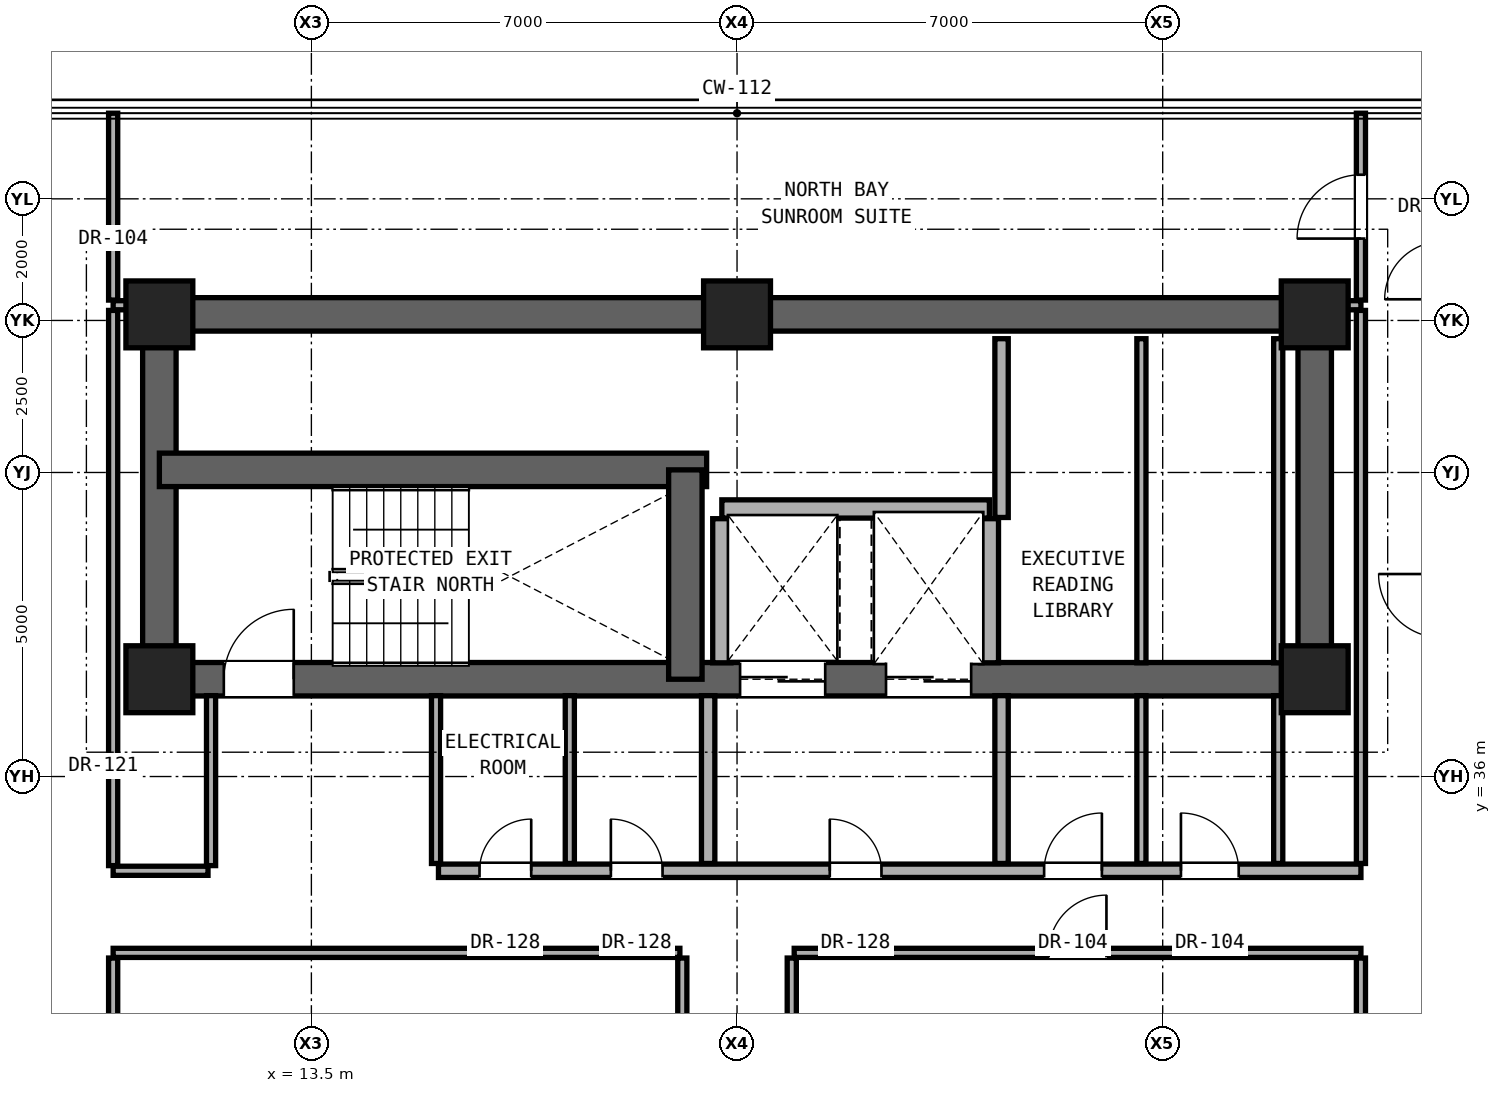
"""IFC4 building model, lengths in metres.
Left out: names, types, materials, properties, quantities, classifications, styles, units other than length and angle.
Written with IfcOpenShell. Run it as: python <this file> out.ifc"""

import sys

from ifc_helpers import new_model, si_unit, direction, frame, frame_2d, origin, origin_2d, place, context, subcontext, project, spatial, rectangle, extrude, element, fill, save


model = new_model("IFC4")
c1 = context("Model", 3, precision=1e-05, world=origin(), true_north=direction((0.0, 1.0)))
c2 = subcontext(c1, "Body", "Model", "MODEL_VIEW")
j1 = project(units=[si_unit("LENGTHUNIT", "METRE"), si_unit("PLANEANGLEUNIT", "RADIAN")], contexts=[c1])
p1 = place(None, origin())
s1 = spatial("IfcSite", under=j1, at=p1, CompositionType="ELEMENT")
p2 = place(p1, origin())
s2 = spatial("IfcBuilding", under=s1, at=p2, CompositionType="ELEMENT")
p3 = place(p2, frame((0.0, 0.0, 137.9)))
s3 = spatial("IfcBuildingStorey", under=s2, at=p3, CompositionType="ELEMENT", Elevation=137.9)
for number, where, z_axis, x_axis in (
    (1, (11.0, 37.6, 0.0), (0.0, 0.0, 1.0), (1.0, 0.0, 0.0)),
    (2, (30.0, 37.6, 0.0), (0.0, 0.0, 1.0), (1.0, 0.0, 0.0)),
    (3, (11.0, 43.6, 0.0), (0.0, 0.0, 1.0), (1.0, 0.0, 0.0)),
    (4, (20.5, 43.6, 0.0), (0.0, 0.0, 1.0), (1.0, 0.0, 0.0)),
    (5, (30.0, 43.6, 0.0), (0.0, 0.0, 1.0), (1.0, 0.0, 0.0)),
):
    element("IfcColumn", number, at=place(p3, frame(where, z_axis=z_axis, x_axis=x_axis)), inside=s3, PredefinedType="COLUMN", context=c2, shape_type="SweptSolid", body=[
        extrude(rectangle(XDim=1.1, YDim=1.1, at=origin_2d()), origin(), (0.0, 0.0, 1.0), 3.3),
    ])
p4 = place(p3, frame((11.0, 43.6, 0.0), z_axis=(0.0, 0.0, 1.0), x_axis=(1.0, 0.0, 0.0)))
e6 = element("IfcWall", 6, at=p4, inside=s3, PredefinedType="SHEAR", context=c2, shape_type="SweptSolid", body=[
    extrude(rectangle(XDim=19.0, YDim=0.55, at=frame_2d((9.5, 0.0))), origin(), (0.0, 0.0, 1.0), 3.08),
])
for number, where, z_axis, x_axis in (
    (7, (11.0, 37.6, 0.0), (0.0, 0.0, 1.0), (0.0, 1.0, 0.0)),
    (8, (30.0, 37.6, 0.0), (0.0, 0.0, 1.0), (0.0, 1.0, 0.0)),
):
    element("IfcWall", number, at=place(p3, frame(where, z_axis=z_axis, x_axis=x_axis)), inside=s3, PredefinedType="SHEAR", context=c2, shape_type="SweptSolid", body=[
        extrude(rectangle(XDim=6.0, YDim=0.55, at=frame_2d((3.0, 0.0))), origin(), (0.0, 0.0, 1.0), 3.08),
    ])
p5 = place(p3, frame((11.0, 37.6, 0.0), z_axis=(0.0, 0.0, 1.0), x_axis=(1.0, 0.0, 0.0)))
e9 = element("IfcWall", 9, at=p5, inside=s3, PredefinedType="SHEAR", context=c2, shape_type="SweptSolid", body=[
    extrude(rectangle(XDim=19.0, YDim=0.55, at=frame_2d((9.5, 0.0))), origin(), (0.0, 0.0, 1.0), 3.08),
])
p6 = place(p5, frame((1.06, 0.0, 0.0)))
e10 = element("IfcOpeningElement", 10, at=p6, cuts=e9, PredefinedType="OPENING", context=c2, shape_type="SweptSolid", body=[
    extrude(rectangle(XDim=1.15, YDim=2.2, at=frame_2d((0.575, 1.1))), frame((0.0, 0.285, 0.0), z_axis=(0.0, -1.0, 0.0), x_axis=(1.0, 0.0, 0.0)), (0.0, 0.0, 1.0), 0.57),
])
p7 = place(p5, frame((9.55, 0.0, 0.0)))
e11 = element("IfcOpeningElement", 11, at=p7, cuts=e9, PredefinedType="OPENING", context=c2, shape_type="SweptSolid", body=[
    extrude(rectangle(XDim=1.4, YDim=2.35, at=frame_2d((0.7, 1.175))), frame((0.0, 0.285, 0.0), z_axis=(0.0, -1.0, 0.0), x_axis=(1.0, 0.0, 0.0)), (0.0, 0.0, 1.0), 0.57),
])
p8 = place(p5, frame((11.95, 0.0, 0.0)))
e12 = element("IfcOpeningElement", 12, at=p8, cuts=e9, PredefinedType="OPENING", context=c2, shape_type="SweptSolid", body=[
    extrude(rectangle(XDim=1.4, YDim=2.35, at=frame_2d((0.7, 1.175))), frame((0.0, 0.285, 0.0), z_axis=(0.0, -1.0, 0.0), x_axis=(1.0, 0.0, 0.0)), (0.0, 0.0, 1.0), 0.57),
])
p9 = place(p3, frame((11.0, 41.043, 0.0), z_axis=(0.0, 0.0, 1.0), x_axis=(1.0, 0.0, 0.0)))
e13 = element("IfcWall", 13, at=p9, inside=s3, PredefinedType="SHEAR", context=c2, shape_type="SweptSolid", body=[
    extrude(rectangle(XDim=9.0, YDim=0.55, at=frame_2d((4.5, 0.0))), origin(), (0.0, 0.0, 1.0), 3.08),
])
p10 = place(p3, frame((19.65, 37.6, 0.0), z_axis=(0.0, 0.0, 1.0), x_axis=(0.0, 1.0, 0.0)))
e14 = element("IfcWall", 14, at=p10, inside=s3, PredefinedType="SHEAR", context=c2, shape_type="SweptSolid", body=[
    extrude(rectangle(XDim=3.443, YDim=0.55, at=frame_2d((1.721, 0.0))), origin(), (0.0, 0.0, 1.0), 3.08),
])
p11 = place(p3, frame((10.24, 33.1, 0.0), z_axis=(0.0, 0.0, 1.0), x_axis=(1.0, 0.0, 0.0)))
e15 = element("IfcWall", 15, at=p11, inside=s3, PredefinedType="PARTITIONING", context=c2, shape_type="SweptSolid", body=[
    extrude(rectangle(XDim=9.32, YDim=0.15, at=frame_2d((4.66, 0.0))), origin(), (0.0, 0.0, 1.0), 2.216),
])
p12 = place(p3, frame((21.44, 33.1, 0.0), z_axis=(0.0, 0.0, 1.0), x_axis=(1.0, 0.0, 0.0)))
e16 = element("IfcWall", 16, at=p12, inside=s3, PredefinedType="PARTITIONING", context=c2, shape_type="SweptSolid", body=[
    extrude(rectangle(XDim=9.32, YDim=0.15, at=frame_2d((4.66, 0.0))), origin(), (0.0, 0.0, 1.0), 2.216),
])
p13 = place(p12, frame((4.185, 0.0, 0.0)))
e17 = element("IfcOpeningElement", 17, at=p13, cuts=e16, PredefinedType="OPENING", context=c2, shape_type="SweptSolid", body=[
    extrude(rectangle(XDim=0.95, YDim=2.15, at=frame_2d((0.475, 1.075))), frame((0.0, 0.085, 0.0), z_axis=(0.0, -1.0, 0.0), x_axis=(1.0, 0.0, 0.0)), (0.0, 0.0, 1.0), 0.17),
])
p14 = place(p3, frame((10.24, 34.45, 0.0), z_axis=(0.0, 0.0, 1.0), x_axis=(1.0, 0.0, 0.0)))
e18 = element("IfcWall", 18, at=p14, inside=s3, PredefinedType="PARTITIONING", context=c2, shape_type="SweptSolid", body=[
    extrude(rectangle(XDim=1.56, YDim=0.15, at=frame_2d((0.78, 0.0))), origin(), (0.0, 0.0, 1.0), 2.216),
])
p15 = place(p3, frame((15.59, 34.45, 0.0), z_axis=(0.0, 0.0, 1.0), x_axis=(1.0, 0.0, 0.0)))
e19 = element("IfcWall", 19, at=p15, inside=s3, PredefinedType="SOLIDWALL", context=c2, shape_type="SweptSolid", body=[
    extrude(rectangle(XDim=15.17, YDim=0.22, at=frame_2d((7.585, 0.0))), origin(), (0.0, 0.0, 1.0), 2.216),
])
p16 = place(p15, frame((6.435, 0.0, 0.0)))
e20 = element("IfcOpeningElement", 20, at=p16, cuts=e19, PredefinedType="OPENING", context=c2, shape_type="SweptSolid", body=[
    extrude(rectangle(XDim=0.85, YDim=2.01, at=frame_2d((0.425, 1.005))), frame((0.0, 0.12, 0.0), z_axis=(0.0, -1.0, 0.0), x_axis=(1.0, 0.0, 0.0)), (0.0, 0.0, 1.0), 0.24),
])
p17 = place(p15, frame((9.96, 0.0, 0.0)))
e21 = element("IfcOpeningElement", 21, at=p17, cuts=e19, PredefinedType="OPENING", context=c2, shape_type="SweptSolid", body=[
    extrude(rectangle(XDim=0.95, YDim=2.15, at=frame_2d((0.475, 1.075))), frame((0.0, 0.12, 0.0), z_axis=(0.0, -1.0, 0.0), x_axis=(1.0, 0.0, 0.0)), (0.0, 0.0, 1.0), 0.24),
])
p18 = place(p15, frame((12.21, 0.0, 0.0)))
e22 = element("IfcOpeningElement", 22, at=p18, cuts=e19, PredefinedType="OPENING", context=c2, shape_type="SweptSolid", body=[
    extrude(rectangle(XDim=0.95, YDim=2.15, at=frame_2d((0.475, 1.075))), frame((0.0, 0.12, 0.0), z_axis=(0.0, -1.0, 0.0), x_axis=(1.0, 0.0, 0.0)), (0.0, 0.0, 1.0), 0.24),
])
p19 = place(p15, frame((0.675, 0.0, 0.0)))
e23 = element("IfcOpeningElement", 23, at=p19, cuts=e19, PredefinedType="OPENING", context=c2, shape_type="SweptSolid", body=[
    extrude(rectangle(XDim=0.85, YDim=2.01, at=frame_2d((0.425, 1.005))), frame((0.0, 0.12, 0.0), z_axis=(0.0, -1.0, 0.0), x_axis=(1.0, 0.0, 0.0)), (0.0, 0.0, 1.0), 0.24),
])
p20 = place(p15, frame((2.835, 0.0, 0.0)))
e24 = element("IfcOpeningElement", 24, at=p20, cuts=e19, PredefinedType="OPENING", context=c2, shape_type="SweptSolid", body=[
    extrude(rectangle(XDim=0.85, YDim=2.01, at=frame_2d((0.425, 1.005))), frame((0.0, 0.12, 0.0), z_axis=(0.0, -1.0, 0.0), x_axis=(1.0, 0.0, 0.0)), (0.0, 0.0, 1.0), 0.24),
])
p21 = place(p3, frame((20.25, 40.4, 0.0), z_axis=(0.0, 0.0, 1.0), x_axis=(1.0, 0.0, 0.0)))
e25 = element("IfcWall", 25, at=p21, inside=s3, PredefinedType="SOLIDWALL", context=c2, shape_type="SweptSolid", body=[
    extrude(rectangle(XDim=4.4, YDim=0.3, at=frame_2d((2.2, 0.0))), origin(), (0.0, 0.0, 1.0), 3.08),
])
for number, where, z_axis, x_axis in (
    (26, (10.24, 43.75, 0.0), (0.0, 0.0, 1.0), (1.0, 0.0, 0.0)),
    (27, (30.27, 43.75, 0.0), (0.0, 0.0, 1.0), (1.0, 0.0, 0.0)),
):
    element("IfcWall", number, at=place(p3, frame(where, z_axis=z_axis, x_axis=x_axis)), inside=s3, PredefinedType="PARTITIONING", context=c2, shape_type="SweptSolid", body=[
        extrude(rectangle(XDim=0.49, YDim=0.15, at=frame_2d((0.245, 0.0))), origin(), (0.0, 0.0, 1.0), 3.08),
    ])
p22 = place(p3, frame((10.24, 27.485, 0.0), z_axis=(0.0, 0.0, 1.0), x_axis=(0.0, 1.0, 0.0)))
e28 = element("IfcWall", 28, at=p22, inside=s3, PredefinedType="PARTITIONING", context=c2, shape_type="SweptSolid", body=[
    extrude(rectangle(XDim=5.53, YDim=0.15, at=frame_2d((2.765, 0.0))), origin(), (0.0, 0.0, 1.0), 2.299),
])
p23 = place(p22, frame((2.29, 0.0, 0.0)))
e29 = element("IfcOpeningElement", 29, at=p23, cuts=e28, PredefinedType="OPENING", context=c2, shape_type="SweptSolid", body=[
    extrude(rectangle(XDim=0.95, YDim=2.15, at=frame_2d((0.475, 1.075))), frame((0.0, 0.085, 0.0), z_axis=(0.0, -1.0, 0.0), x_axis=(1.0, 0.0, 0.0)), (0.0, 0.0, 1.0), 0.17),
])
p24 = place(p3, frame((10.24, 34.535, 0.0), z_axis=(0.0, 0.0, 1.0), x_axis=(0.0, 1.0, 0.0)))
e30 = element("IfcWall", 30, at=p24, inside=s3, PredefinedType="PARTITIONING", context=c2, shape_type="SweptSolid", body=[
    extrude(rectangle(XDim=9.13, YDim=0.15, at=frame_2d((4.565, 0.0))), origin(), (0.0, 0.0, 1.0), 2.456),
])
p25 = place(p3, frame((10.24, 43.835, 0.0), z_axis=(0.0, 0.0, 1.0), x_axis=(0.0, 1.0, 0.0)))
e31 = element("IfcWall", 31, at=p25, inside=s3, PredefinedType="PARTITIONING", context=c2, shape_type="SweptSolid", body=[
    extrude(rectangle(XDim=3.073, YDim=0.15, at=frame_2d((1.537, 0.0))), origin(), (0.0, 0.0, 1.0), 3.08),
])
p26 = place(p3, frame((11.85, 34.535, 0.0), z_axis=(0.0, 0.0, 1.0), x_axis=(0.0, 1.0, 0.0)))
e32 = element("IfcWall", 32, at=p26, inside=s3, PredefinedType="PARTITIONING", context=c2, shape_type="SweptSolid", body=[
    extrude(rectangle(XDim=2.795, YDim=0.15, at=frame_2d((1.397, 0.0))), origin(), (0.0, 0.0, 1.0), 3.08),
])
p27 = place(p3, frame((15.55, 34.57, 0.0), z_axis=(0.0, 0.0, 1.0), x_axis=(0.0, 1.0, 0.0)))
e33 = element("IfcWall", 33, at=p27, inside=s3, PredefinedType="PARTITIONING", context=c2, shape_type="SweptSolid", body=[
    extrude(rectangle(XDim=2.76, YDim=0.15, at=frame_2d((1.38, 0.0))), origin(), (0.0, 0.0, 1.0), 2.609),
])
p28 = place(p3, frame((17.75, 34.57, 0.0), z_axis=(0.0, 0.0, 1.0), x_axis=(0.0, 1.0, 0.0)))
e34 = element("IfcWall", 34, at=p28, inside=s3, PredefinedType="PARTITIONING", context=c2, shape_type="SweptSolid", body=[
    extrude(rectangle(XDim=2.76, YDim=0.15, at=frame_2d((1.38, 0.0))), origin(), (0.0, 0.0, 1.0), 3.08),
])
p29 = place(p3, frame((19.6, 27.485, 0.0), z_axis=(0.0, 0.0, 1.0), x_axis=(0.0, 1.0, 0.0)))
e35 = element("IfcWall", 35, at=p29, inside=s3, PredefinedType="PARTITIONING", context=c2, shape_type="SweptSolid", body=[
    extrude(rectangle(XDim=5.53, YDim=0.15, at=frame_2d((2.765, 0.0))), origin(), (0.0, 0.0, 1.0), 2.216),
])
p30 = place(p3, frame((20.025, 34.57, 0.0), z_axis=(0.0, 0.0, 1.0), x_axis=(0.0, 1.0, 0.0)))
e36 = element("IfcWall", 36, at=p30, inside=s3, PredefinedType="SOLIDWALL", context=c2, shape_type="SweptSolid", body=[
    extrude(rectangle(XDim=2.76, YDim=0.22, at=frame_2d((1.38, 0.0))), origin(), (0.0, 0.0, 1.0), 3.08),
])
p31 = place(p3, frame((20.25, 37.87, 0.0), z_axis=(0.0, 0.0, 1.0), x_axis=(0.0, 1.0, 0.0)))
e37 = element("IfcWall", 37, at=p31, inside=s3, PredefinedType="SOLIDWALL", context=c2, shape_type="SweptSolid", body=[
    extrude(rectangle(XDim=2.37, YDim=0.3, at=frame_2d((1.185, 0.0))), origin(), (0.0, 0.0, 1.0), 3.08),
])
p32 = place(p3, frame((21.4, 27.485, 0.0), z_axis=(0.0, 0.0, 1.0), x_axis=(0.0, 1.0, 0.0)))
e38 = element("IfcWall", 38, at=p32, inside=s3, PredefinedType="PARTITIONING", context=c2, shape_type="SweptSolid", body=[
    extrude(rectangle(XDim=5.53, YDim=0.15, at=frame_2d((2.765, 0.0))), origin(), (0.0, 0.0, 1.0), 2.216),
])
p33 = place(p3, frame((24.65, 37.87, 0.0), z_axis=(0.0, 0.0, 1.0), x_axis=(0.0, 1.0, 0.0)))
e39 = element("IfcWall", 39, at=p33, inside=s3, PredefinedType="SOLIDWALL", context=c2, shape_type="SweptSolid", body=[
    extrude(rectangle(XDim=2.37, YDim=0.3, at=frame_2d((1.185, 0.0))), origin(), (0.0, 0.0, 1.0), 3.08),
])
p34 = place(p3, frame((24.85, 34.57, 0.0), z_axis=(0.0, 0.0, 1.0), x_axis=(0.0, 1.0, 0.0)))
e40 = element("IfcWall", 40, at=p34, inside=s3, PredefinedType="SOLIDWALL", context=c2, shape_type="SweptSolid", body=[
    extrude(rectangle(XDim=2.76, YDim=0.22, at=frame_2d((1.38, 0.0))), origin(), (0.0, 0.0, 1.0), 3.08),
])
p35 = place(p3, frame((24.85, 40.26, 0.0), z_axis=(0.0, 0.0, 1.0), x_axis=(0.0, 1.0, 0.0)))
e41 = element("IfcWall", 41, at=p35, inside=s3, PredefinedType="SOLIDWALL", context=c2, shape_type="SweptSolid", body=[
    extrude(rectangle(XDim=2.94, YDim=0.22, at=frame_2d((1.47, 0.0))), origin(), (0.0, 0.0, 1.0), 3.08),
])
p36 = place(p3, frame((27.15, 34.57, 0.0), z_axis=(0.0, 0.0, 1.0), x_axis=(0.0, 1.0, 0.0)))
e42 = element("IfcWall", 42, at=p36, inside=s3, PredefinedType="PARTITIONING", context=c2, shape_type="SweptSolid", body=[
    extrude(rectangle(XDim=2.76, YDim=0.15, at=frame_2d((1.38, 0.0))), origin(), (0.0, 0.0, 1.0), 3.08),
])
p37 = place(p3, frame((27.15, 37.87, 0.0), z_axis=(0.0, 0.0, 1.0), x_axis=(0.0, 1.0, 0.0)))
e43 = element("IfcWall", 43, at=p37, inside=s3, PredefinedType="PARTITIONING", context=c2, shape_type="SweptSolid", body=[
    extrude(rectangle(XDim=5.33, YDim=0.15, at=frame_2d((2.665, 0.0))), origin(), (0.0, 0.0, 1.0), 3.08),
])
p38 = place(p3, frame((29.4, 34.57, 0.0), z_axis=(0.0, 0.0, 1.0), x_axis=(0.0, 1.0, 0.0)))
e44 = element("IfcWall", 44, at=p38, inside=s3, PredefinedType="PARTITIONING", context=c2, shape_type="SweptSolid", body=[
    extrude(rectangle(XDim=2.76, YDim=0.15, at=frame_2d((1.38, 0.0))), origin(), (0.0, 0.0, 1.0), 3.08),
])
p39 = place(p3, frame((29.4, 37.87, 0.0), z_axis=(0.0, 0.0, 1.0), x_axis=(0.0, 1.0, 0.0)))
e45 = element("IfcWall", 45, at=p39, inside=s3, PredefinedType="PARTITIONING", context=c2, shape_type="SweptSolid", body=[
    extrude(rectangle(XDim=5.33, YDim=0.15, at=frame_2d((2.665, 0.0))), origin(), (0.0, 0.0, 1.0), 3.08),
])
p40 = place(p3, frame((30.76, 27.485, 0.0), z_axis=(0.0, 0.0, 1.0), x_axis=(0.0, 1.0, 0.0)))
e46 = element("IfcWall", 46, at=p40, inside=s3, PredefinedType="PARTITIONING", context=c2, shape_type="SweptSolid", body=[
    extrude(rectangle(XDim=5.53, YDim=0.15, at=frame_2d((2.765, 0.0))), origin(), (0.0, 0.0, 1.0), 2.299),
])
p41 = place(p3, frame((30.76, 34.57, 0.0), z_axis=(0.0, 0.0, 1.0), x_axis=(0.0, 1.0, 0.0)))
e47 = element("IfcWall", 47, at=p41, inside=s3, PredefinedType="PARTITIONING", context=c2, shape_type="SweptSolid", body=[
    extrude(rectangle(XDim=9.095, YDim=0.15, at=frame_2d((4.547, 0.0))), origin(), (0.0, 0.0, 1.0), 2.456),
])
p42 = place(p3, frame((30.76, 43.835, 0.0), z_axis=(0.0, 0.0, 1.0), x_axis=(0.0, 1.0, 0.0)))
e48 = element("IfcWall", 48, at=p42, inside=s3, PredefinedType="PARTITIONING", context=c2, shape_type="SweptSolid", body=[
    extrude(rectangle(XDim=3.073, YDim=0.15, at=frame_2d((1.537, 0.0))), origin(), (0.0, 0.0, 1.0), 3.08),
])
p43 = place(p42, frame((1.011, 0.0, 0.0)))
e49 = element("IfcOpeningElement", 49, at=p43, cuts=e48, PredefinedType="OPENING", context=c2, shape_type="SweptSolid", body=[
    extrude(rectangle(XDim=1.05, YDim=2.2, at=frame_2d((0.525, 1.1))), frame((0.0, 0.085, 0.0), z_axis=(0.0, -1.0, 0.0), x_axis=(1.0, 0.0, 0.0)), (0.0, 0.0, 1.0), 0.17),
])
p44 = place(p6, origin())
e50 = element("IfcDoor", 50, at=p44, inside=s3, OperationType="SINGLE_SWING_RIGHT", PredefinedType="DOOR", context=c2, shape_type="SweptSolid", body=[
    extrude(rectangle(XDim=1.15, YDim=2.2, at=frame_2d((0.575, 1.1))), frame((0.0, 0.025, 0.0), z_axis=(0.0, -1.0, 0.0), x_axis=(1.0, 0.0, 0.0)), (0.0, 0.0, 1.0), 0.05),
])
fill(e10, e50)
p45 = place(p16, origin())
e51 = element("IfcDoor", 51, at=p45, inside=s3, OperationType="SINGLE_SWING_LEFT", PredefinedType="DOOR", context=c2, shape_type="SweptSolid", body=[
    extrude(rectangle(XDim=0.85, YDim=2.01, at=frame_2d((0.425, 1.005))), frame((0.0, 0.025, 0.0), z_axis=(0.0, -1.0, 0.0), x_axis=(1.0, 0.0, 0.0)), (0.0, 0.0, 1.0), 0.05),
])
fill(e20, e51)
p46 = place(p17, origin())
e52 = element("IfcDoor", 52, at=p46, inside=s3, OperationType="SINGLE_SWING_RIGHT", PredefinedType="DOOR", context=c2, shape_type="SweptSolid", body=[
    extrude(rectangle(XDim=0.95, YDim=2.15, at=frame_2d((0.475, 1.075))), frame((0.0, 0.025, 0.0), z_axis=(0.0, -1.0, 0.0), x_axis=(1.0, 0.0, 0.0)), (0.0, 0.0, 1.0), 0.05),
])
fill(e21, e52)
p47 = place(p18, origin())
e53 = element("IfcDoor", 53, at=p47, inside=s3, OperationType="SINGLE_SWING_LEFT", PredefinedType="DOOR", context=c2, shape_type="SweptSolid", body=[
    extrude(rectangle(XDim=0.95, YDim=2.15, at=frame_2d((0.475, 1.075))), frame((0.0, 0.025, 0.0), z_axis=(0.0, -1.0, 0.0), x_axis=(1.0, 0.0, 0.0)), (0.0, 0.0, 1.0), 0.05),
])
fill(e22, e53)
p48 = place(p19, origin())
e54 = element("IfcDoor", 54, at=p48, inside=s3, OperationType="SINGLE_SWING_RIGHT", PredefinedType="DOOR", context=c2, shape_type="SweptSolid", body=[
    extrude(rectangle(XDim=0.85, YDim=2.01, at=frame_2d((0.425, 1.005))), frame((0.0, 0.025, 0.0), z_axis=(0.0, -1.0, 0.0), x_axis=(1.0, 0.0, 0.0)), (0.0, 0.0, 1.0), 0.05),
])
fill(e23, e54)
p49 = place(p20, origin())
e55 = element("IfcDoor", 55, at=p49, inside=s3, OperationType="SINGLE_SWING_LEFT", PredefinedType="DOOR", context=c2, shape_type="SweptSolid", body=[
    extrude(rectangle(XDim=0.85, YDim=2.01, at=frame_2d((0.425, 1.005))), frame((0.0, 0.025, 0.0), z_axis=(0.0, -1.0, 0.0), x_axis=(1.0, 0.0, 0.0)), (0.0, 0.0, 1.0), 0.05),
])
fill(e24, e55)
p50 = place(p13, origin())
e56 = element("IfcDoor", 56, at=p50, inside=s3, OperationType="SINGLE_SWING_RIGHT", PredefinedType="DOOR", context=c2, shape_type="SweptSolid", body=[
    extrude(rectangle(XDim=0.95, YDim=2.15, at=frame_2d((0.475, 1.075))), frame((0.0, 0.025, 0.0), z_axis=(0.0, -1.0, 0.0), x_axis=(1.0, 0.0, 0.0)), (0.0, 0.0, 1.0), 0.05),
])
fill(e17, e56)
p51 = place(p43, origin())
e57 = element("IfcDoor", 57, at=p51, inside=s3, OperationType="SINGLE_SWING_LEFT", PredefinedType="DOOR", context=c2, shape_type="SweptSolid", body=[
    extrude(rectangle(XDim=1.05, YDim=2.2, at=frame_2d((0.525, 1.1))), frame((0.0, 0.025, 0.0), z_axis=(0.0, -1.0, 0.0), x_axis=(1.0, 0.0, 0.0)), (0.0, 0.0, 1.0), 0.05),
])
fill(e49, e57)
p52 = place(p7, origin())
e58 = element("IfcDoor", 58, at=p52, inside=s3, OperationType="DOUBLE_DOOR_SLIDING", PredefinedType="DOOR", context=c2, shape_type="SweptSolid", body=[
    extrude(rectangle(XDim=1.4, YDim=2.35, at=frame_2d((0.7, 1.175))), frame((0.0, 0.025, 0.0), z_axis=(0.0, -1.0, 0.0), x_axis=(1.0, 0.0, 0.0)), (0.0, 0.0, 1.0), 0.05),
])
fill(e11, e58)
p53 = place(p8, origin())
e59 = element("IfcDoor", 59, at=p53, inside=s3, OperationType="DOUBLE_DOOR_SLIDING", PredefinedType="DOOR", context=c2, shape_type="SweptSolid", body=[
    extrude(rectangle(XDim=1.4, YDim=2.35, at=frame_2d((0.7, 1.175))), frame((0.0, 0.025, 0.0), z_axis=(0.0, -1.0, 0.0), x_axis=(1.0, 0.0, 0.0)), (0.0, 0.0, 1.0), 0.05),
])
fill(e12, e59)
save(model, sys.argv[1])
